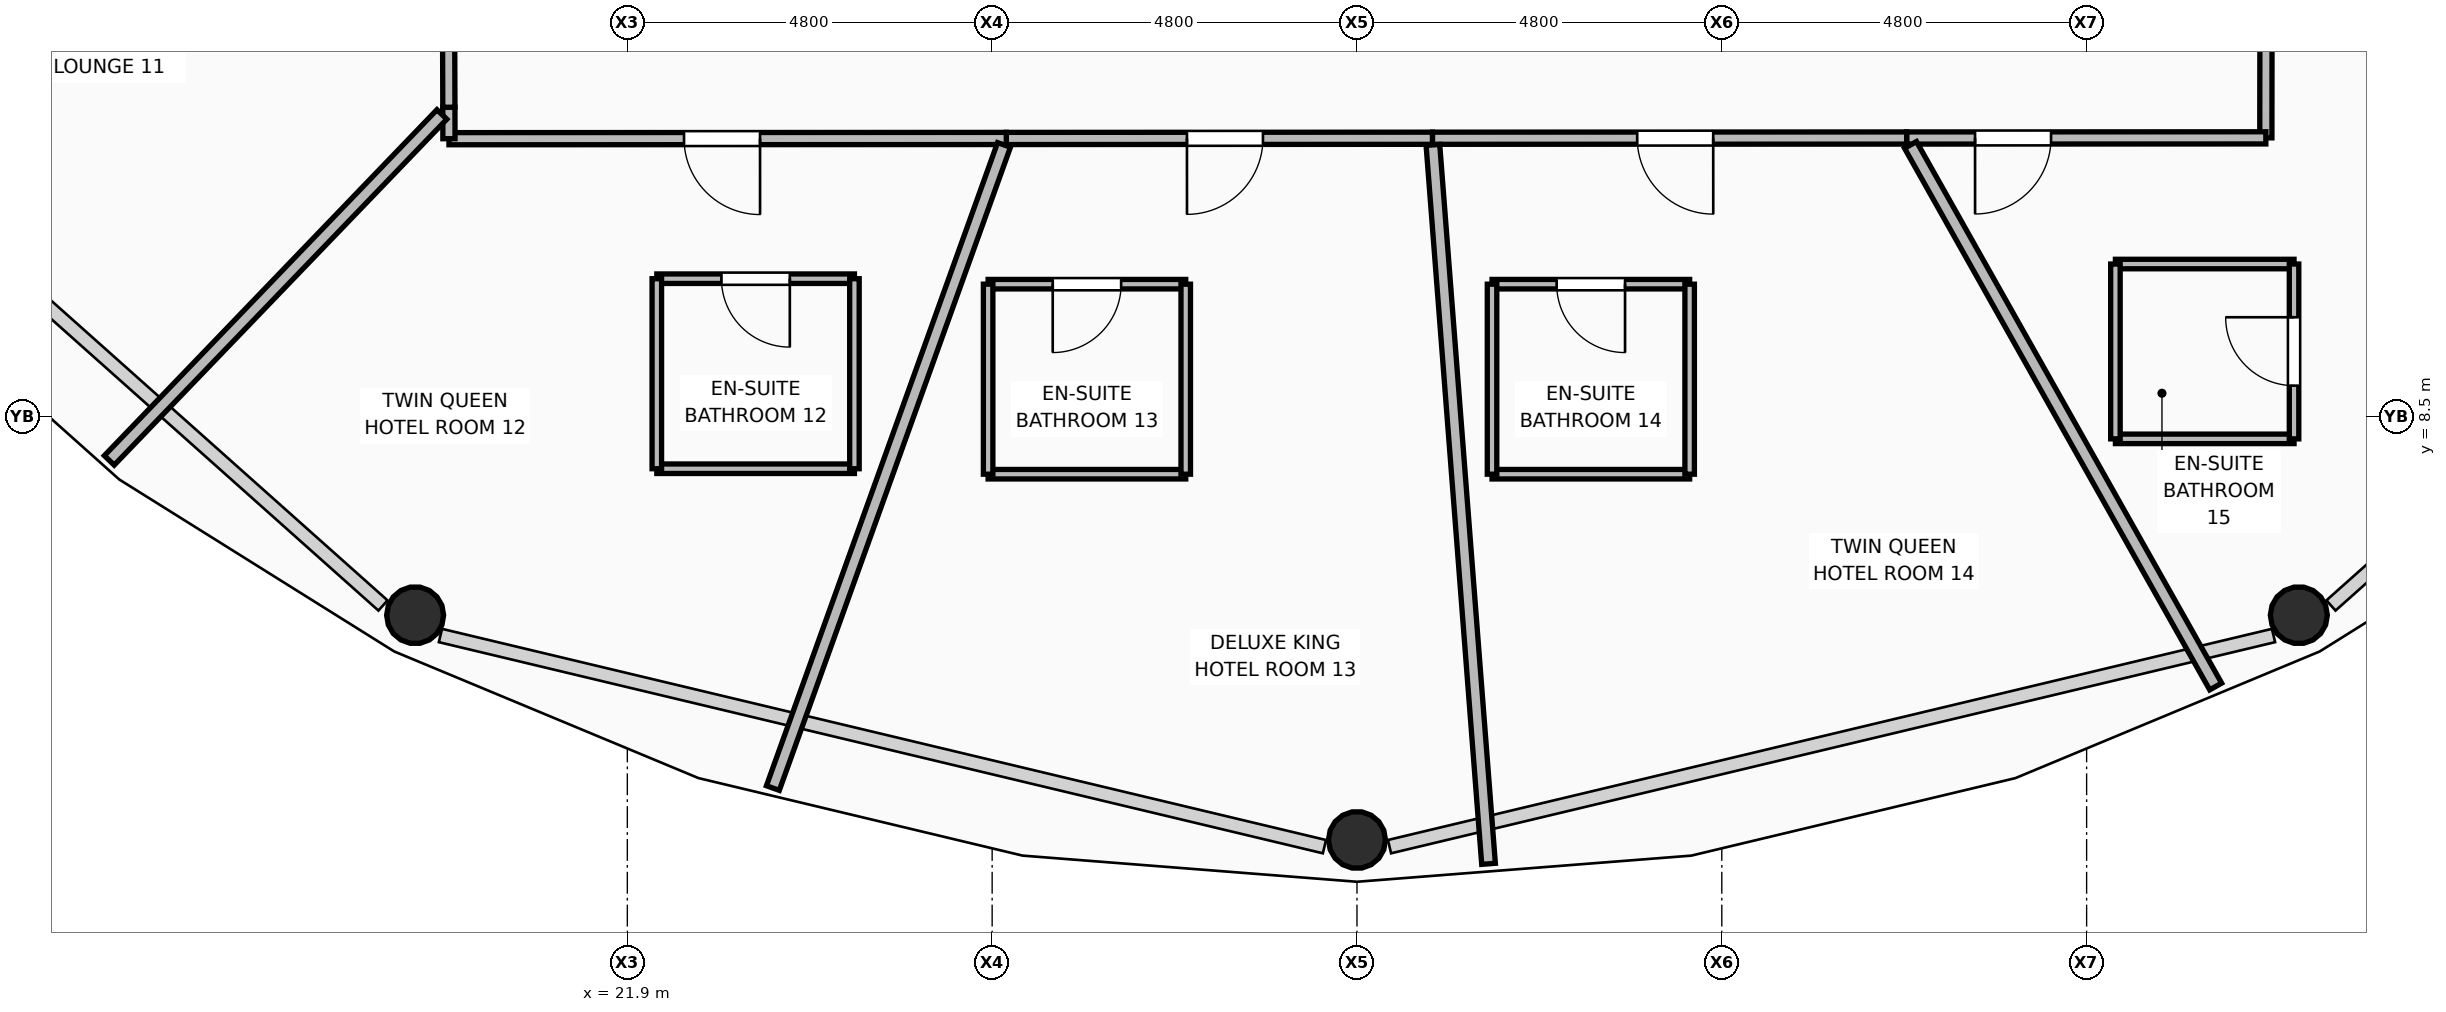
"""IFC4 building model, lengths in metres.
Left out: names, types, materials, properties, quantities, classifications, styles, units other than length and angle.
Written with IfcOpenShell. Run it as: python <this file> out.ifc"""

import sys

from ifc_helpers import new_model, si_unit, direction, frame, frame_2d, origin, origin_2d, place, context, subcontext, project, spatial, rectangle, hollow_circle, extrude, element, fill, save


model = new_model("IFC4")
c1 = context("Model", 3, precision=1e-05, world=origin(), true_north=direction((0.0, 1.0)))
c2 = subcontext(c1, "Body", "Model", "MODEL_VIEW")
j1 = project(units=[si_unit("LENGTHUNIT", "METRE"), si_unit("PLANEANGLEUNIT", "RADIAN")], contexts=[c1])
p1 = place(None, origin())
s1 = spatial("IfcSite", under=j1, at=p1, CompositionType="ELEMENT")
p2 = place(p1, origin())
s2 = spatial("IfcBuilding", under=s1, at=p2, CompositionType="ELEMENT")
p3 = place(p2, frame((0.0, 0.0, 153.45)))
s3 = spatial("IfcBuildingStorey", under=s2, at=p3, CompositionType="ELEMENT", Elevation=153.45)
for number, where, z_axis, x_axis in (
    (1, (19.108, 5.888, 0.0), (0.0, 0.0, 1.0), (1.0, 0.0, 0.0)),
    (2, (31.5, 2.931, 0.0), (0.0, 0.0, 1.0), (1.0, 0.0, 0.0)),
    (3, (43.892, 5.888, 0.0), (0.0, 0.0, 1.0), (1.0, 0.0, 0.0)),
):
    element("IfcColumn", number, at=place(p3, frame(where, z_axis=z_axis, x_axis=x_axis)), inside=s3, PredefinedType="COLUMN", context=c2, shape_type="SweptSolid", body=[
        extrude(hollow_circle(Radius=0.375, WallThickness=0.035, at=origin_2d()), origin(), (0.0, 0.0, 1.0), 3.57),
    ])
p4 = place(p3, frame((43.462, 15.597, 0.0), z_axis=(0.0, 0.0, 1.0), x_axis=(-0.001139194704, -0.999999351118, 0.0)))
e4 = element("IfcWall", 4, at=p4, inside=s3, PredefinedType="PARTITIONING", context=c2, shape_type="SweptSolid", body=[
    extrude(rectangle(XDim=3.429, YDim=0.16, at=frame_2d((1.714, 0.0))), origin(), (0.0, 0.0, 1.0), 3.55),
])
p5 = place(p3, frame((43.458, 12.168, 0.0), z_axis=(0.0, 0.0, 1.0), x_axis=(-0.999999914606, -0.000413265798, 0.0)))
e5 = element("IfcWall", 5, at=p5, inside=s3, PredefinedType="PARTITIONING", context=c2, shape_type="SweptSolid", body=[
    extrude(rectangle(XDim=4.726, YDim=0.16, at=frame_2d((2.363, 0.0))), origin(), (0.0, 0.0, 1.0), 3.006),
])
p6 = place(p5, frame((2.826, 0.0, 0.0)))
e6 = element("IfcOpeningElement", 6, at=p6, cuts=e5, PredefinedType="OPENING", context=c2, shape_type="SweptSolid", body=[
    extrude(rectangle(XDim=1.0, YDim=2.1, at=frame_2d((0.5, 1.05))), frame((0.0, 0.09, 0.0), z_axis=(0.0, -1.0, 0.0), x_axis=(1.0, 0.0, 0.0)), (0.0, 0.0, 1.0), 0.18),
])
p7 = place(p3, frame((38.732, 12.166, 0.0), z_axis=(0.0, 0.0, 1.0), x_axis=(-0.999999889749, -0.000469575374, 0.0)))
e7 = element("IfcWall", 7, at=p7, inside=s3, PredefinedType="PARTITIONING", context=c2, shape_type="SweptSolid", body=[
    extrude(rectangle(XDim=6.239, YDim=0.16, at=frame_2d((3.12, 0.0))), origin(), (0.0, 0.0, 1.0), 3.55),
])
p8 = place(p7, frame((2.545, 0.0, 0.0)))
e8 = element("IfcOpeningElement", 8, at=p8, cuts=e7, PredefinedType="OPENING", context=c2, shape_type="SweptSolid", body=[
    extrude(rectangle(XDim=1.0, YDim=2.1, at=frame_2d((0.5, 1.05))), frame((0.0, 0.09, 0.0), z_axis=(0.0, -1.0, 0.0), x_axis=(1.0, 0.0, 0.0)), (0.0, 0.0, 1.0), 0.18),
])
p9 = place(p3, frame((32.493, 12.163, 0.0), z_axis=(0.0, 0.0, 1.0), x_axis=(-0.999999839791, -0.000566054076, 0.0)))
e9 = element("IfcWall", 9, at=p9, inside=s3, PredefinedType="PARTITIONING", context=c2, shape_type="SweptSolid", body=[
    extrude(rectangle(XDim=5.607, YDim=0.16, at=frame_2d((2.803, 0.0))), origin(), (0.0, 0.0, 1.0), 3.006),
])
p10 = place(p9, frame((2.23, 0.0, 0.0)))
e10 = element("IfcOpeningElement", 10, at=p10, cuts=e9, PredefinedType="OPENING", context=c2, shape_type="SweptSolid", body=[
    extrude(rectangle(XDim=1.0, YDim=2.1, at=frame_2d((0.5, 1.05))), frame((0.0, 0.09, 0.0), z_axis=(0.0, -1.0, 0.0), x_axis=(1.0, 0.0, 0.0)), (0.0, 0.0, 1.0), 0.18),
])
p11 = place(p3, frame((26.886, 12.16, 0.0), z_axis=(0.0, 0.0, 1.0), x_axis=(-0.999999920192, -0.000399520543, 0.0)))
e11 = element("IfcWall", 11, at=p11, inside=s3, PredefinedType="PARTITIONING", context=c2, shape_type="SweptSolid", body=[
    extrude(rectangle(XDim=7.333, YDim=0.16, at=frame_2d((3.667, 0.0))), origin(), (0.0, 0.0, 1.0), 3.006),
])
p12 = place(p11, frame((3.24, 0.0, 0.0)))
e12 = element("IfcOpeningElement", 12, at=p12, cuts=e11, PredefinedType="OPENING", context=c2, shape_type="SweptSolid", body=[
    extrude(rectangle(XDim=1.0, YDim=2.1, at=frame_2d((0.5, 1.05))), frame((0.0, 0.09, 0.0), z_axis=(0.0, -1.0, 0.0), x_axis=(1.0, 0.0, 0.0)), (0.0, 0.0, 1.0), 0.18),
])
p13 = place(p3, frame((19.553, 12.157, 0.0), z_axis=(0.0, 0.0, 1.0), x_axis=(-0.002358484007, 0.999997218773, 0.0)))
e13 = element("IfcWall", 13, at=p13, inside=s3, PredefinedType="PARTITIONING", context=c2, shape_type="SweptSolid", body=[
    extrude(rectangle(XDim=0.414, YDim=0.16, at=frame_2d((0.207, 0.0))), origin(), (0.0, 0.0, 1.0), 3.55),
])
p14 = place(p3, frame((19.552, 12.571, 0.0), z_axis=(0.0, 0.0, 1.0), x_axis=(-0.003171279301, 0.999994971481, 0.0)))
e14 = element("IfcWall", 14, at=p14, inside=s3, PredefinedType="PARTITIONING", context=c2, shape_type="SweptSolid", body=[
    extrude(rectangle(XDim=5.389, YDim=0.16, at=frame_2d((2.694, 0.0))), origin(), (0.0, 0.0, 1.0), 3.006),
])
p15 = place(p14, frame((4.029, 0.0, 0.0)))
e15 = element("IfcOpeningElement", 15, at=p15, cuts=e14, PredefinedType="OPENING", context=c2, shape_type="SweptSolid", body=[
    extrude(rectangle(XDim=1.2, YDim=2.1, at=frame_2d((0.6, 1.05))), frame((0.0, 0.09, 0.0), z_axis=(0.0, -1.0, 0.0), x_axis=(1.0, 0.0, 0.0)), (0.0, 0.0, 1.0), 0.18),
])
p16 = place(p3, frame((19.46, 12.476, 0.0), z_axis=(0.0, 0.0, 1.0), x_axis=(-0.69310794346, -0.72083380797, 0.0)))
e16 = element("IfcWall", 16, at=p16, inside=s3, PredefinedType="PARTITIONING", context=c2, shape_type="SweptSolid", body=[
    extrude(rectangle(XDim=6.313, YDim=0.18, at=frame_2d((3.157, 0.0))), origin(), (0.0, 0.0, 1.0), 2.852),
])
p17 = place(p3, frame((26.856, 12.075, 0.0), z_axis=(0.0, 0.0, 1.0), x_axis=(-0.338234798657, -0.941061751947, 0.0)))
e17 = element("IfcWall", 17, at=p17, inside=s3, PredefinedType="PARTITIONING", context=c2, shape_type="SweptSolid", body=[
    extrude(rectangle(XDim=8.991, YDim=0.18, at=frame_2d((4.495, 0.0))), origin(), (0.0, 0.0, 1.0), 2.852),
])
p18 = place(p3, frame((32.499, 12.075, 0.0), z_axis=(0.0, 0.0, 1.0), x_axis=(0.077157016632, -0.997018954075, 0.0)))
e18 = element("IfcWall", 18, at=p18, inside=s3, PredefinedType="PARTITIONING", context=c2, shape_type="SweptSolid", body=[
    extrude(rectangle(XDim=9.486, YDim=0.18, at=frame_2d((4.743, 0.0))), origin(), (0.0, 0.0, 1.0), 2.852),
])
p19 = place(p3, frame((38.783, 12.075, 0.0), z_axis=(0.0, 0.0, 1.0), x_axis=(0.490941390618, -0.871192602688, 0.0)))
e19 = element("IfcWall", 19, at=p19, inside=s3, PredefinedType="PARTITIONING", context=c2, shape_type="SweptSolid", body=[
    extrude(rectangle(XDim=8.178, YDim=0.18, at=frame_2d((4.089, 0.0))), origin(), (0.0, 0.0, 1.0), 2.852),
])
p20 = place(p3, frame((43.54, 15.536, 0.0), z_axis=(0.0, 0.0, 1.0), x_axis=(0.786155203297, -0.618029122558, 0.0)))
e20 = element("IfcWall", 20, at=p20, inside=s3, PredefinedType="PARTITIONING", context=c2, shape_type="SweptSolid", body=[
    extrude(rectangle(XDim=8.726, YDim=0.18, at=frame_2d((4.363, 0.0))), origin(), (0.0, 0.0, 1.0), 2.852),
])
p21 = place(p3, frame((22.288, 7.815, 0.0), z_axis=(0.0, 0.0, 1.0), x_axis=(1.0, 0.0, 0.0)))
e21 = element("IfcWall", 21, at=p21, inside=s3, PredefinedType="PARTITIONING", context=c2, shape_type="SweptSolid", body=[
    extrude(rectangle(XDim=2.6, YDim=0.125, at=frame_2d((1.3, 0.0))), origin(), (0.0, 0.0, 1.0), 3.55),
])
p22 = place(p3, frame((22.288, 10.315, 0.0), z_axis=(0.0, 0.0, 1.0), x_axis=(1.0, 0.0, 0.0)))
e22 = element("IfcWall", 22, at=p22, inside=s3, PredefinedType="PARTITIONING", context=c2, shape_type="SweptSolid", body=[
    extrude(rectangle(XDim=2.6, YDim=0.125, at=frame_2d((1.3, 0.0))), origin(), (0.0, 0.0, 1.0), 3.55),
])
p23 = place(p22, frame((0.85, 0.0, 0.0)))
e23 = element("IfcOpeningElement", 23, at=p23, cuts=e22, PredefinedType="OPENING", context=c2, shape_type="SweptSolid", body=[
    extrude(rectangle(XDim=0.9, YDim=2.1, at=frame_2d((0.45, 1.05))), frame((0.0, 0.073, 0.0), z_axis=(0.0, -1.0, 0.0), x_axis=(1.0, 0.0, 0.0)), (0.0, 0.0, 1.0), 0.145),
])
for number, where, z_axis, x_axis in (
    (24, (22.288, 7.815, 0.0), (0.0, 0.0, 1.0), (0.0, 1.0, 0.0)),
    (25, (24.888, 7.815, 0.0), (0.0, 0.0, 1.0), (0.0, 1.0, 0.0)),
):
    element("IfcWall", number, at=place(p3, frame(where, z_axis=z_axis, x_axis=x_axis)), inside=s3, PredefinedType="PARTITIONING", context=c2, shape_type="SweptSolid", body=[
        extrude(rectangle(XDim=2.5, YDim=0.125, at=frame_2d((1.25, 0.0))), origin(), (0.0, 0.0, 1.0), 3.55),
    ])
p24 = place(p3, frame((26.647, 7.743, 0.0), z_axis=(0.0, 0.0, 1.0), x_axis=(1.0, 0.0, 0.0)))
e26 = element("IfcWall", 26, at=p24, inside=s3, PredefinedType="PARTITIONING", context=c2, shape_type="SweptSolid", body=[
    extrude(rectangle(XDim=2.6, YDim=0.125, at=frame_2d((1.3, 0.0))), origin(), (0.0, 0.0, 1.0), 3.55),
])
p25 = place(p3, frame((26.647, 10.243, 0.0), z_axis=(0.0, 0.0, 1.0), x_axis=(1.0, 0.0, 0.0)))
e27 = element("IfcWall", 27, at=p25, inside=s3, PredefinedType="PARTITIONING", context=c2, shape_type="SweptSolid", body=[
    extrude(rectangle(XDim=2.6, YDim=0.125, at=frame_2d((1.3, 0.0))), origin(), (0.0, 0.0, 1.0), 3.55),
])
p26 = place(p25, frame((0.85, 0.0, 0.0)))
e28 = element("IfcOpeningElement", 28, at=p26, cuts=e27, PredefinedType="OPENING", context=c2, shape_type="SweptSolid", body=[
    extrude(rectangle(XDim=0.9, YDim=2.1, at=frame_2d((0.45, 1.05))), frame((0.0, 0.073, 0.0), z_axis=(0.0, -1.0, 0.0), x_axis=(1.0, 0.0, 0.0)), (0.0, 0.0, 1.0), 0.145),
])
for number, where, z_axis, x_axis in (
    (29, (26.647, 7.743, 0.0), (0.0, 0.0, 1.0), (0.0, 1.0, 0.0)),
    (30, (29.247, 7.743, 0.0), (0.0, 0.0, 1.0), (0.0, 1.0, 0.0)),
):
    element("IfcWall", number, at=place(p3, frame(where, z_axis=z_axis, x_axis=x_axis)), inside=s3, PredefinedType="PARTITIONING", context=c2, shape_type="SweptSolid", body=[
        extrude(rectangle(XDim=2.5, YDim=0.125, at=frame_2d((1.25, 0.0))), origin(), (0.0, 0.0, 1.0), 3.55),
    ])
p27 = place(p3, frame((33.277, 7.743, 0.0), z_axis=(0.0, 0.0, 1.0), x_axis=(1.0, 0.0, 0.0)))
e31 = element("IfcWall", 31, at=p27, inside=s3, PredefinedType="PARTITIONING", context=c2, shape_type="SweptSolid", body=[
    extrude(rectangle(XDim=2.6, YDim=0.125, at=frame_2d((1.3, 0.0))), origin(), (0.0, 0.0, 1.0), 3.55),
])
p28 = place(p3, frame((33.277, 10.243, 0.0), z_axis=(0.0, 0.0, 1.0), x_axis=(1.0, 0.0, 0.0)))
e32 = element("IfcWall", 32, at=p28, inside=s3, PredefinedType="PARTITIONING", context=c2, shape_type="SweptSolid", body=[
    extrude(rectangle(XDim=2.6, YDim=0.125, at=frame_2d((1.3, 0.0))), origin(), (0.0, 0.0, 1.0), 3.55),
])
p29 = place(p28, frame((0.85, 0.0, 0.0)))
e33 = element("IfcOpeningElement", 33, at=p29, cuts=e32, PredefinedType="OPENING", context=c2, shape_type="SweptSolid", body=[
    extrude(rectangle(XDim=0.9, YDim=2.1, at=frame_2d((0.45, 1.05))), frame((0.0, 0.073, 0.0), z_axis=(0.0, -1.0, 0.0), x_axis=(1.0, 0.0, 0.0)), (0.0, 0.0, 1.0), 0.145),
])
for number, where, z_axis, x_axis in (
    (34, (33.277, 7.743, 0.0), (0.0, 0.0, 1.0), (0.0, 1.0, 0.0)),
    (35, (35.877, 7.743, 0.0), (0.0, 0.0, 1.0), (0.0, 1.0, 0.0)),
):
    element("IfcWall", number, at=place(p3, frame(where, z_axis=z_axis, x_axis=x_axis)), inside=s3, PredefinedType="PARTITIONING", context=c2, shape_type="SweptSolid", body=[
        extrude(rectangle(XDim=2.5, YDim=0.125, at=frame_2d((1.25, 0.0))), origin(), (0.0, 0.0, 1.0), 3.55),
    ])
for number, where, z_axis, x_axis in (
    (36, (41.479, 8.208, 0.0), (0.0, 0.0, 1.0), (1.0, 0.0, 0.0)),
    (37, (41.479, 10.508, 0.0), (0.0, 0.0, 1.0), (1.0, 0.0, 0.0)),
):
    element("IfcWall", number, at=place(p3, frame(where, z_axis=z_axis, x_axis=x_axis)), inside=s3, PredefinedType="PARTITIONING", context=c2, shape_type="SweptSolid", body=[
        extrude(rectangle(XDim=2.35, YDim=0.125, at=frame_2d((1.175, 0.0))), origin(), (0.0, 0.0, 1.0), 3.006),
    ])
p30 = place(p3, frame((41.479, 8.208, 0.0), z_axis=(0.0, 0.0, 1.0), x_axis=(0.0, 1.0, 0.0)))
e38 = element("IfcWall", 38, at=p30, inside=s3, PredefinedType="PARTITIONING", context=c2, shape_type="SweptSolid", body=[
    extrude(rectangle(XDim=2.3, YDim=0.125, at=frame_2d((1.15, 0.0))), origin(), (0.0, 0.0, 1.0), 3.55),
])
p31 = place(p3, frame((43.829, 8.208, 0.0), z_axis=(0.0, 0.0, 1.0), x_axis=(0.0, 1.0, 0.0)))
e39 = element("IfcWall", 39, at=p31, inside=s3, PredefinedType="PARTITIONING", context=c2, shape_type="SweptSolid", body=[
    extrude(rectangle(XDim=2.3, YDim=0.125, at=frame_2d((1.15, 0.0))), origin(), (0.0, 0.0, 1.0), 3.55),
])
p32 = place(p31, frame((0.7, 0.0, 0.0)))
e40 = element("IfcOpeningElement", 40, at=p32, cuts=e39, PredefinedType="OPENING", context=c2, shape_type="SweptSolid", body=[
    extrude(rectangle(XDim=0.9, YDim=2.1, at=frame_2d((0.45, 1.05))), frame((0.0, 0.073, 0.0), z_axis=(0.0, -1.0, 0.0), x_axis=(1.0, 0.0, 0.0)), (0.0, 0.0, 1.0), 0.145),
])
p33 = place(p23, frame((0.9, 0.0, 0.0), z_axis=(0.0, 0.0, 1.0), x_axis=(-1.0, 0.0, 0.0)))
e41 = element("IfcDoor", 41, at=p33, inside=s3, OperationType="SINGLE_SWING_LEFT", PredefinedType="DOOR", context=c2, shape_type="SweptSolid", body=[
    extrude(rectangle(XDim=0.9, YDim=2.1, at=frame_2d((0.45, 1.05))), frame((0.0, 0.025, 0.0), z_axis=(0.0, -1.0, 0.0), x_axis=(1.0, 0.0, 0.0)), (0.0, 0.0, 1.0), 0.05),
])
fill(e23, e41)
p34 = place(p12, origin())
e42 = element("IfcDoor", 42, at=p34, inside=s3, OperationType="SINGLE_SWING_LEFT", PredefinedType="DOOR", context=c2, shape_type="SweptSolid", body=[
    extrude(rectangle(XDim=1.0, YDim=2.1, at=frame_2d((0.5, 1.05))), frame((0.0, 0.025, 0.0), z_axis=(0.0, -1.0, 0.0), x_axis=(1.0, 0.0, 0.0)), (0.0, 0.0, 1.0), 0.05),
])
fill(e12, e42)
p35 = place(p26, frame((0.9, 0.0, 0.0), z_axis=(0.0, 0.0, 1.0), x_axis=(-1.0, 0.0, 0.0)))
e43 = element("IfcDoor", 43, at=p35, inside=s3, OperationType="SINGLE_SWING_RIGHT", PredefinedType="DOOR", context=c2, shape_type="SweptSolid", body=[
    extrude(rectangle(XDim=0.9, YDim=2.1, at=frame_2d((0.45, 1.05))), frame((0.0, 0.025, 0.0), z_axis=(0.0, -1.0, 0.0), x_axis=(1.0, 0.0, 0.0)), (0.0, 0.0, 1.0), 0.05),
])
fill(e28, e43)
p36 = place(p10, origin())
e44 = element("IfcDoor", 44, at=p36, inside=s3, OperationType="SINGLE_SWING_RIGHT", PredefinedType="DOOR", context=c2, shape_type="SweptSolid", body=[
    extrude(rectangle(XDim=1.0, YDim=2.1, at=frame_2d((0.5, 1.05))), frame((0.0, 0.025, 0.0), z_axis=(0.0, -1.0, 0.0), x_axis=(1.0, 0.0, 0.0)), (0.0, 0.0, 1.0), 0.05),
])
fill(e10, e44)
p37 = place(p29, frame((0.9, 0.0, 0.0), z_axis=(0.0, 0.0, 1.0), x_axis=(-1.0, 0.0, 0.0)))
e45 = element("IfcDoor", 45, at=p37, inside=s3, OperationType="SINGLE_SWING_LEFT", PredefinedType="DOOR", context=c2, shape_type="SweptSolid", body=[
    extrude(rectangle(XDim=0.9, YDim=2.1, at=frame_2d((0.45, 1.05))), frame((0.0, 0.025, 0.0), z_axis=(0.0, -1.0, 0.0), x_axis=(1.0, 0.0, 0.0)), (0.0, 0.0, 1.0), 0.05),
])
fill(e33, e45)
p38 = place(p8, origin())
e46 = element("IfcDoor", 46, at=p38, inside=s3, OperationType="SINGLE_SWING_LEFT", PredefinedType="DOOR", context=c2, shape_type="SweptSolid", body=[
    extrude(rectangle(XDim=1.0, YDim=2.1, at=frame_2d((0.5, 1.05))), frame((0.0, 0.025, 0.0), z_axis=(0.0, -1.0, 0.0), x_axis=(1.0, 0.0, 0.0)), (0.0, 0.0, 1.0), 0.05),
])
fill(e8, e46)
p39 = place(p32, origin())
e47 = element("IfcDoor", 47, at=p39, inside=s3, OperationType="SINGLE_SWING_RIGHT", PredefinedType="DOOR", context=c2, shape_type="SweptSolid", body=[
    extrude(rectangle(XDim=0.9, YDim=2.1, at=frame_2d((0.45, 1.05))), frame((0.0, 0.025, 0.0), z_axis=(0.0, -1.0, 0.0), x_axis=(1.0, 0.0, 0.0)), (0.0, 0.0, 1.0), 0.05),
])
fill(e40, e47)
p40 = place(p6, origin())
e48 = element("IfcDoor", 48, at=p40, inside=s3, OperationType="SINGLE_SWING_RIGHT", PredefinedType="DOOR", context=c2, shape_type="SweptSolid", body=[
    extrude(rectangle(XDim=1.0, YDim=2.1, at=frame_2d((0.5, 1.05))), frame((0.0, 0.025, 0.0), z_axis=(0.0, -1.0, 0.0), x_axis=(1.0, 0.0, 0.0)), (0.0, 0.0, 1.0), 0.05),
])
fill(e6, e48)
save(model, sys.argv[1])
